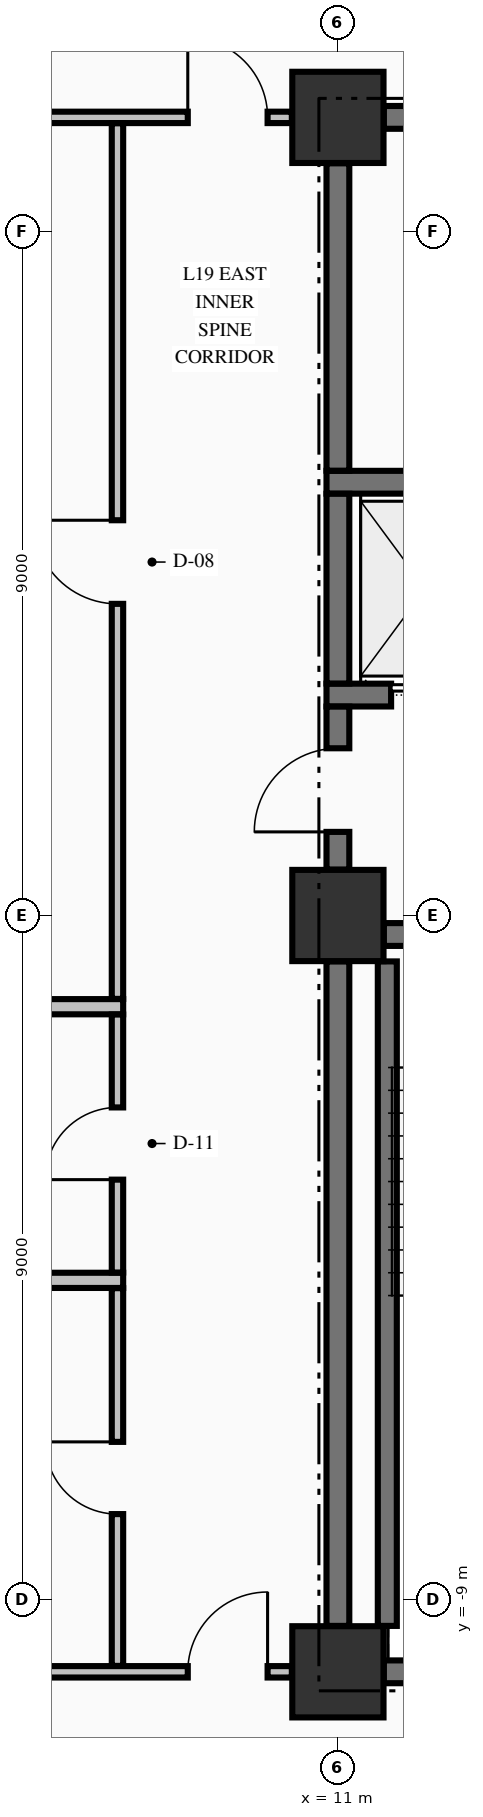
"""IFC4 building model, lengths in metres.
Left out: names, types, materials, properties, quantities, classifications, styles, units other than length and angle.
Written with IfcOpenShell. Run it as: python <this file> out.ifc"""

import sys

from ifc_helpers import new_model, si_unit, direction, frame, frame_2d, origin, origin_2d, place, context, subcontext, project, spatial, rectangle, extrude, element, fill, save


model = new_model("IFC4")
c1 = context("Model", 3, precision=1e-05, world=origin(), true_north=direction((0.0, 1.0)))
c2 = subcontext(c1, "Body", "Model", "MODEL_VIEW")
j1 = project(units=[si_unit("LENGTHUNIT", "METRE"), si_unit("PLANEANGLEUNIT", "RADIAN")], contexts=[c1])
p1 = place(None, origin())
s1 = spatial("IfcSite", under=j1, at=p1, CompositionType="ELEMENT")
p2 = place(p1, origin())
s2 = spatial("IfcBuilding", under=s1, at=p2, CompositionType="ELEMENT")
p3 = place(p2, frame((0.0, 0.0, 78.61)))
s3 = spatial("IfcBuildingStorey", under=s2, at=p3, CompositionType="ELEMENT", Elevation=78.61)
for number, where, z_axis, x_axis in (
    (1, (11.0, -9.95, -0.25), (0.0, 0.0, 1.0), (1.0, 0.0, 0.0)),
    (2, (11.0, 0.0, -0.25), (0.0, 0.0, 1.0), (1.0, 0.0, 0.0)),
    (3, (11.0, 10.5, -0.25), (0.0, 0.0, 1.0), (1.0, 0.0, 0.0)),
):
    element("IfcColumn", number, at=place(p3, frame(where, z_axis=z_axis, x_axis=x_axis)), inside=s3, PredefinedType="COLUMN", context=c2, shape_type="SweptSolid", body=[
        extrude(rectangle(XDim=1.2, YDim=1.2, at=origin_2d()), origin(), (0.0, 0.0, 1.0), 3.395),
    ])
p4 = place(p3, frame((11.604, -9.95, 0.0), z_axis=(0.0, 0.0, 1.0), x_axis=(1.0, 0.0, 0.0)))
e4 = element("IfcWall", 4, at=p4, inside=s3, PredefinedType="SHEAR", context=c2, shape_type="SweptSolid", body=[
    extrude(rectangle(XDim=3.096, YDim=0.3, at=frame_2d((1.548, 0.0))), origin(), (0.0, 0.0, 1.0), 3.145),
])
p5 = place(p3, frame((11.604, -0.25, 0.0), z_axis=(0.0, 0.0, 1.0), x_axis=(1.0, 0.0, 0.0)))
e5 = element("IfcWall", 5, at=p5, inside=s3, PredefinedType="SHEAR", context=c2, shape_type="SweptSolid", body=[
    extrude(rectangle(XDim=3.271, YDim=0.3, at=frame_2d((1.635, 0.0))), origin(), (0.0, 0.0, 1.0), 3.145),
])
p6 = place(p5, frame((0.996, 0.0, 0.0)))
e6 = element("IfcOpeningElement", 6, at=p6, cuts=e5, PredefinedType="OPENING", context=c2, shape_type="SweptSolid", body=[
    extrude(rectangle(XDim=1.1, YDim=2.15, at=frame_2d((0.55, 1.075))), frame((0.0, 0.16, 0.0), z_axis=(0.0, -1.0, 0.0), x_axis=(1.0, 0.0, 0.0)), (0.0, 0.0, 1.0), 0.32),
])
p7 = place(p3, frame((10.85, 2.9, 0.0), z_axis=(0.0, 0.0, 1.0), x_axis=(1.0, 0.0, 0.0)))
e7 = element("IfcWall", 7, at=p7, inside=s3, PredefinedType="SHEAR", context=c2, shape_type="SweptSolid", body=[
    extrude(rectangle(XDim=4.025, YDim=0.3, at=frame_2d((2.012, 0.0))), origin(), (0.0, 0.0, 1.0), 3.145),
])
p8 = place(p7, frame((0.85, 0.0, 0.0)))
e8 = element("IfcOpeningElement", 8, at=p8, cuts=e7, PredefinedType="OPENING", context=c2, shape_type="SweptSolid", body=[
    extrude(rectangle(XDim=1.1, YDim=2.2, at=frame_2d((0.55, 1.1))), frame((0.0, 0.16, 0.0), z_axis=(0.0, -1.0, 0.0), x_axis=(1.0, 0.0, 0.0)), (0.0, 0.0, 1.0), 0.32),
])
p9 = place(p3, frame((10.85, 5.7, 0.0), z_axis=(0.0, 0.0, 1.0), x_axis=(1.0, 0.0, 0.0)))
e9 = element("IfcWall", 9, at=p9, inside=s3, PredefinedType="SHEAR", context=c2, shape_type="SweptSolid", body=[
    extrude(rectangle(XDim=4.025, YDim=0.3, at=frame_2d((2.012, 0.0))), origin(), (0.0, 0.0, 1.0), 3.145),
])
p10 = place(p3, frame((11.604, 10.5, 0.0), z_axis=(0.0, 0.0, 1.0), x_axis=(1.0, 0.0, 0.0)))
e10 = element("IfcWall", 10, at=p10, inside=s3, PredefinedType="SHEAR", context=c2, shape_type="SweptSolid", body=[
    extrude(rectangle(XDim=3.096, YDim=0.3, at=frame_2d((1.548, 0.0))), origin(), (0.0, 0.0, 1.0), 3.145),
])
p11 = place(p10, frame((1.371, 0.0, 0.0)))
e11 = element("IfcOpeningElement", 11, at=p11, cuts=e10, PredefinedType="OPENING", context=c2, shape_type="SweptSolid", body=[
    extrude(rectangle(XDim=0.95, YDim=2.15, at=frame_2d((0.475, 1.075))), frame((0.0, 0.16, 0.0), z_axis=(0.0, -1.0, 0.0), x_axis=(1.0, 0.0, 0.0)), (0.0, 0.0, 1.0), 0.32),
])
p12 = place(p3, frame((-10.394, -9.95, 0.0), z_axis=(0.0, 0.0, 1.0), x_axis=(1.0, 0.0, 0.0)))
e12 = element("IfcWall", 12, at=p12, inside=s3, PredefinedType="PARTITIONING", context=c2, shape_type="SweptSolid", body=[
    extrude(rectangle(XDim=20.788, YDim=0.15, at=frame_2d((10.394, 0.0))), origin(), (0.0, 0.0, 1.0), 3.145),
])
p13 = place(p12, frame((0.319, 0.0, 0.0)))
e13 = element("IfcOpeningElement", 13, at=p13, cuts=e12, PredefinedType="OPENING", context=c2, shape_type="SweptSolid", body=[
    extrude(rectangle(XDim=1.05, YDim=2.15, at=frame_2d((0.525, 1.075))), frame((0.0, 0.085, 0.0), z_axis=(0.0, -1.0, 0.0), x_axis=(1.0, 0.0, 0.0)), (0.0, 0.0, 1.0), 0.17),
])
p14 = place(p12, frame((19.419, 0.0, 0.0)))
e14 = element("IfcOpeningElement", 14, at=p14, cuts=e12, PredefinedType="OPENING", context=c2, shape_type="SweptSolid", body=[
    extrude(rectangle(XDim=1.05, YDim=2.15, at=frame_2d((0.525, 1.075))), frame((0.0, 0.085, 0.0), z_axis=(0.0, -1.0, 0.0), x_axis=(1.0, 0.0, 0.0)), (0.0, 0.0, 1.0), 0.17),
])
p15 = place(p12, frame((11.569, 0.0, 0.0)))
e15 = element("IfcOpeningElement", 15, at=p15, cuts=e12, PredefinedType="OPENING", context=c2, shape_type="SweptSolid", body=[
    extrude(rectangle(XDim=0.95, YDim=2.15, at=frame_2d((0.475, 1.075))), frame((0.0, 0.085, 0.0), z_axis=(0.0, -1.0, 0.0), x_axis=(1.0, 0.0, 0.0)), (0.0, 0.0, 1.0), 0.17),
])
for number, where, z_axis, x_axis in (
    (16, (-1.9, -4.8, 0.0), (0.0, 0.0, 1.0), (1.0, 0.0, 0.0)),
    (17, (-1.9, -1.2, 0.0), (0.0, 0.0, 1.0), (1.0, 0.0, 0.0)),
):
    element("IfcWall", number, at=place(p3, frame(where, z_axis=z_axis, x_axis=x_axis)), inside=s3, PredefinedType="PARTITIONING", context=c2, shape_type="SweptSolid", body=[
        extrude(rectangle(XDim=10.075, YDim=0.2, at=frame_2d((5.038, 0.0))), origin(), (0.0, 0.0, 1.0), 3.145),
    ])
p16 = place(p3, frame((-10.394, 10.5, 0.0), z_axis=(0.0, 0.0, 1.0), x_axis=(1.0, 0.0, 0.0)))
e18 = element("IfcWall", 18, at=p16, inside=s3, PredefinedType="PARTITIONING", context=c2, shape_type="SweptSolid", body=[
    extrude(rectangle(XDim=20.788, YDim=0.15, at=frame_2d((10.394, 0.0))), origin(), (0.0, 0.0, 1.0), 3.145),
])
p17 = place(p16, frame((0.319, 0.0, 0.0)))
e19 = element("IfcOpeningElement", 19, at=p17, cuts=e18, PredefinedType="OPENING", context=c2, shape_type="SweptSolid", body=[
    extrude(rectangle(XDim=1.05, YDim=2.15, at=frame_2d((0.525, 1.075))), frame((0.0, 0.085, 0.0), z_axis=(0.0, -1.0, 0.0), x_axis=(1.0, 0.0, 0.0)), (0.0, 0.0, 1.0), 0.17),
])
p18 = place(p16, frame((19.419, 0.0, 0.0)))
e20 = element("IfcOpeningElement", 20, at=p18, cuts=e18, PredefinedType="OPENING", context=c2, shape_type="SweptSolid", body=[
    extrude(rectangle(XDim=1.05, YDim=2.15, at=frame_2d((0.525, 1.075))), frame((0.0, 0.085, 0.0), z_axis=(0.0, -1.0, 0.0), x_axis=(1.0, 0.0, 0.0)), (0.0, 0.0, 1.0), 0.17),
])
p19 = place(p3, frame((11.0, -9.346, 0.0), z_axis=(0.0, 0.0, 1.0), x_axis=(0.0, 1.0, 0.0)))
e21 = element("IfcWall", 21, at=p19, inside=s3, PredefinedType="SHEAR", context=c2, shape_type="SweptSolid", body=[
    extrude(rectangle(XDim=8.742, YDim=0.3, at=frame_2d((4.371, 0.0))), origin(), (0.0, 0.0, 1.0), 3.145),
])
p20 = place(p3, frame((11.0, 0.604, 0.0), z_axis=(0.0, 0.0, 1.0), x_axis=(0.0, 1.0, 0.0)))
e22 = element("IfcWall", 22, at=p20, inside=s3, PredefinedType="SHEAR", context=c2, shape_type="SweptSolid", body=[
    extrude(rectangle(XDim=2.144, YDim=0.3, at=frame_2d((1.072, 0.0))), origin(), (0.0, 0.0, 1.0), 3.145),
])
p21 = place(p20, frame((0.496, 0.0, 0.0)))
e23 = element("IfcOpeningElement", 23, at=p21, cuts=e22, PredefinedType="OPENING", context=c2, shape_type="SweptSolid", body=[
    extrude(rectangle(XDim=1.1, YDim=2.15, at=frame_2d((0.55, 1.075))), frame((0.0, 0.16, 0.0), z_axis=(0.0, -1.0, 0.0), x_axis=(1.0, 0.0, 0.0)), (0.0, 0.0, 1.0), 0.32),
])
p22 = place(p3, frame((11.0, 3.052, 0.0), z_axis=(0.0, 0.0, 1.0), x_axis=(0.0, 1.0, 0.0)))
e24 = element("IfcWall", 24, at=p22, inside=s3, PredefinedType="SHEAR", context=c2, shape_type="SweptSolid", body=[
    extrude(rectangle(XDim=2.496, YDim=0.3, at=frame_2d((1.248, 0.0))), origin(), (0.0, 0.0, 1.0), 3.145),
])
p23 = place(p3, frame((11.0, 5.852, 0.0), z_axis=(0.0, 0.0, 1.0), x_axis=(0.0, 1.0, 0.0)))
e25 = element("IfcWall", 25, at=p23, inside=s3, PredefinedType="SHEAR", context=c2, shape_type="SweptSolid", body=[
    extrude(rectangle(XDim=4.044, YDim=0.3, at=frame_2d((2.022, 0.0))), origin(), (0.0, 0.0, 1.0), 3.145),
])
p24 = place(p3, frame((11.65, -9.346, 0.0), z_axis=(0.0, 0.0, 1.0), x_axis=(0.0, 1.0, 0.0)))
e26 = element("IfcWall", 26, at=p24, inside=s3, PredefinedType="SOLIDWALL", context=c2, shape_type="SweptSolid", body=[
    extrude(rectangle(XDim=8.742, YDim=0.25, at=frame_2d((4.371, 0.0))), origin(), (0.0, 0.0, 1.0), 3.145),
])
p25 = place(p3, frame((8.1, -9.872, 0.0), z_axis=(0.0, 0.0, 1.0), x_axis=(0.0, 1.0, 0.0)))
e27 = element("IfcWall", 27, at=p25, inside=s3, PredefinedType="PARTITIONING", context=c2, shape_type="SweptSolid", body=[
    extrude(rectangle(XDim=4.969, YDim=0.15, at=frame_2d((2.484, 0.0))), origin(), (0.0, 0.0, 1.0), 3.145),
])
p26 = place(p25, frame((1.997, 0.0, 0.0)))
e28 = element("IfcOpeningElement", 28, at=p26, cuts=e27, PredefinedType="OPENING", context=c2, shape_type="SweptSolid", body=[
    extrude(rectangle(XDim=0.95, YDim=2.15, at=frame_2d((0.475, 1.075))), frame((0.0, 0.085, 0.0), z_axis=(0.0, -1.0, 0.0), x_axis=(1.0, 0.0, 0.0)), (0.0, 0.0, 1.0), 0.17),
])
p27 = place(p3, frame((8.1, -4.697, 0.0), z_axis=(0.0, 0.0, 1.0), x_axis=(0.0, 1.0, 0.0)))
e29 = element("IfcWall", 29, at=p27, inside=s3, PredefinedType="PARTITIONING", context=c2, shape_type="SweptSolid", body=[
    extrude(rectangle(XDim=3.394, YDim=0.15, at=frame_2d((1.697, 0.0))), origin(), (0.0, 0.0, 1.0), 3.145),
])
p28 = place(p27, frame((1.222, 0.0, 0.0)))
e30 = element("IfcOpeningElement", 30, at=p28, cuts=e29, PredefinedType="OPENING", context=c2, shape_type="SweptSolid", body=[
    extrude(rectangle(XDim=0.95, YDim=2.15, at=frame_2d((0.475, 1.075))), frame((0.0, 0.085, 0.0), z_axis=(0.0, -1.0, 0.0), x_axis=(1.0, 0.0, 0.0)), (0.0, 0.0, 1.0), 0.17),
])
p29 = place(p3, frame((8.1, -1.097, 0.0), z_axis=(0.0, 0.0, 1.0), x_axis=(0.0, 1.0, 0.0)))
e31 = element("IfcWall", 31, at=p29, inside=s3, PredefinedType="PARTITIONING", context=c2, shape_type="SweptSolid", body=[
    extrude(rectangle(XDim=11.519, YDim=0.15, at=frame_2d((5.76, 0.0))), origin(), (0.0, 0.0, 1.0), 3.145),
])
p30 = place(p29, frame((5.197, 0.0, 0.0)))
e32 = element("IfcOpeningElement", 32, at=p30, cuts=e31, PredefinedType="OPENING", context=c2, shape_type="SweptSolid", body=[
    extrude(rectangle(XDim=1.1, YDim=2.15, at=frame_2d((0.55, 1.075))), frame((0.0, 0.085, 0.0), z_axis=(0.0, -1.0, 0.0), x_axis=(1.0, 0.0, 0.0)), (0.0, 0.0, 1.0), 0.17),
])
p31 = place(p21, origin())
e33 = element("IfcDoor", 33, at=p31, inside=s3, OperationType="SINGLE_SWING_LEFT", PredefinedType="DOOR", context=c2, shape_type="SweptSolid", body=[
    extrude(rectangle(XDim=1.1, YDim=2.15, at=frame_2d((0.55, 1.075))), frame((0.0, 0.025, 0.0), z_axis=(0.0, -1.0, 0.0), x_axis=(1.0, 0.0, 0.0)), (0.0, 0.0, 1.0), 0.05),
])
fill(e23, e33)
p32 = place(p8, origin())
e34 = element("IfcDoor", 34, at=p32, inside=s3, OperationType="SLIDING_TO_RIGHT", PredefinedType="DOOR", context=c2, shape_type="SweptSolid", body=[
    extrude(rectangle(XDim=1.1, YDim=2.2, at=frame_2d((0.55, 1.1))), frame((0.0, 0.025, 0.0), z_axis=(0.0, -1.0, 0.0), x_axis=(1.0, 0.0, 0.0)), (0.0, 0.0, 1.0), 0.05),
])
fill(e8, e34)
p33 = place(p18, origin())
e35 = element("IfcDoor", 35, at=p33, inside=s3, OperationType="SINGLE_SWING_LEFT", PredefinedType="DOOR", context=c2, shape_type="SweptSolid", body=[
    extrude(rectangle(XDim=1.05, YDim=2.15, at=frame_2d((0.525, 1.075))), frame((0.0, 0.025, 0.0), z_axis=(0.0, -1.0, 0.0), x_axis=(1.0, 0.0, 0.0)), (0.0, 0.0, 1.0), 0.05),
])
fill(e20, e35)
p34 = place(p14, origin())
e36 = element("IfcDoor", 36, at=p34, inside=s3, OperationType="SINGLE_SWING_RIGHT", PredefinedType="DOOR", context=c2, shape_type="SweptSolid", body=[
    extrude(rectangle(XDim=1.05, YDim=2.15, at=frame_2d((0.525, 1.075))), frame((0.0, 0.025, 0.0), z_axis=(0.0, -1.0, 0.0), x_axis=(1.0, 0.0, 0.0)), (0.0, 0.0, 1.0), 0.05),
])
fill(e14, e36)
p35 = place(p30, origin())
e37 = element("IfcDoor", 37, at=p35, inside=s3, OperationType="SINGLE_SWING_RIGHT", PredefinedType="DOOR", context=c2, shape_type="SweptSolid", body=[
    extrude(rectangle(XDim=1.1, YDim=2.15, at=frame_2d((0.55, 1.075))), frame((0.0, 0.025, 0.0), z_axis=(0.0, -1.0, 0.0), x_axis=(1.0, 0.0, 0.0)), (0.0, 0.0, 1.0), 0.05),
])
fill(e32, e37)
p36 = place(p28, origin())
e38 = element("IfcDoor", 38, at=p36, inside=s3, OperationType="SINGLE_SWING_LEFT", PredefinedType="DOOR", context=c2, shape_type="SweptSolid", body=[
    extrude(rectangle(XDim=0.95, YDim=2.15, at=frame_2d((0.475, 1.075))), frame((0.0, 0.025, 0.0), z_axis=(0.0, -1.0, 0.0), x_axis=(1.0, 0.0, 0.0)), (0.0, 0.0, 1.0), 0.05),
])
fill(e30, e38)
p37 = place(p26, origin())
e39 = element("IfcDoor", 39, at=p37, inside=s3, OperationType="SINGLE_SWING_RIGHT", PredefinedType="DOOR", context=c2, shape_type="SweptSolid", body=[
    extrude(rectangle(XDim=0.95, YDim=2.15, at=frame_2d((0.475, 1.075))), frame((0.0, 0.025, 0.0), z_axis=(0.0, -1.0, 0.0), x_axis=(1.0, 0.0, 0.0)), (0.0, 0.0, 1.0), 0.05),
])
fill(e28, e39)
save(model, sys.argv[1])
